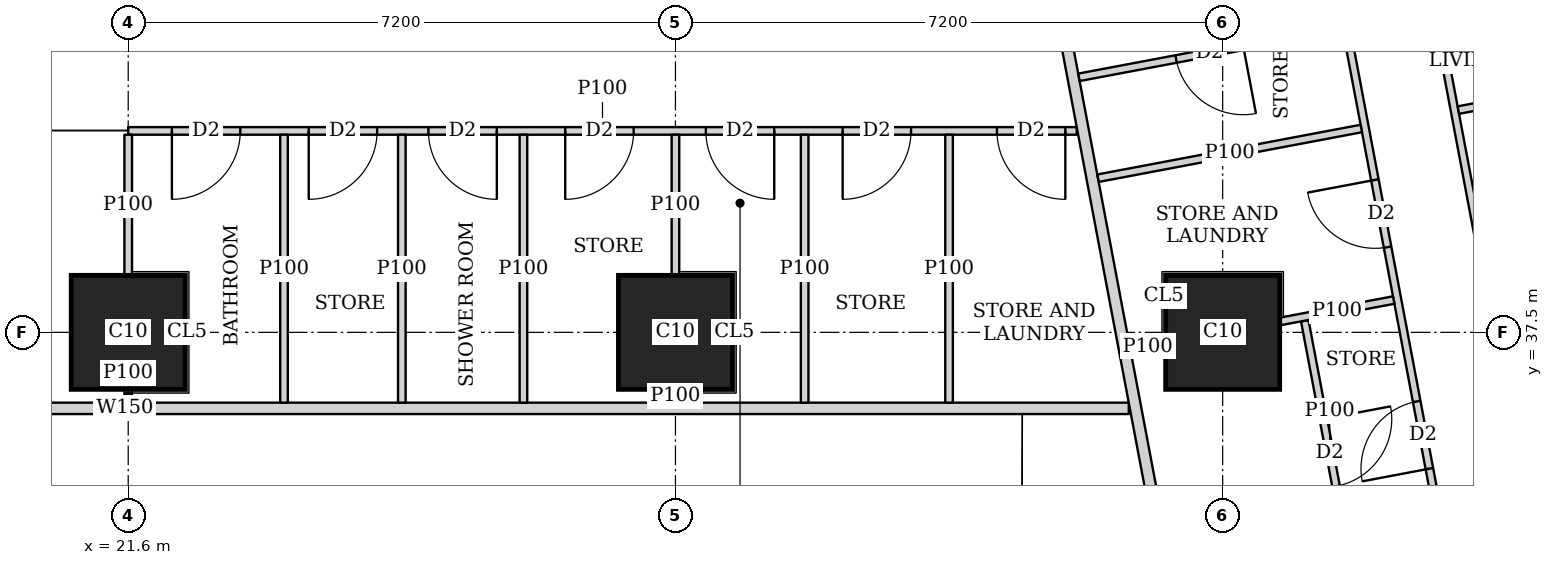
"""IFC4 building model, lengths in metres.
Left out: names, types, materials, properties, quantities, classifications, styles, units other than length and angle.
Written with IfcOpenShell. Run it as: python <this file> out.ifc"""

import sys

from ifc_helpers import new_model, si_unit, direction, frame, frame_2d, origin, origin_2d, place, context, subcontext, project, spatial, rectangle, extrude, element, fill, save


model = new_model("IFC4")
c1 = context("Model", 3, precision=1e-05, world=origin(), true_north=direction((0.0, 1.0)))
c2 = subcontext(c1, "Body", "Model", "MODEL_VIEW")
j1 = project(units=[si_unit("LENGTHUNIT", "METRE"), si_unit("PLANEANGLEUNIT", "RADIAN")], contexts=[c1])
p1 = place(None, origin())
s1 = spatial("IfcSite", under=j1, at=p1, CompositionType="ELEMENT")
p2 = place(p1, origin())
s2 = spatial("IfcBuilding", under=s1, at=p2, CompositionType="ELEMENT")
p3 = place(p2, frame((0.0, 0.0, 139.55)))
s3 = spatial("IfcBuildingStorey", under=s2, at=p3, CompositionType="ELEMENT", Elevation=139.55)
for number, where, z_axis, x_axis in (
    (1, (21.6, 37.5, 0.0), (0.0, 0.0, 1.0), (1.0, 0.0, 0.0)),
    (2, (28.8, 37.5, 0.0), (0.0, 0.0, 1.0), (1.0, 0.0, 0.0)),
    (3, (36.0, 37.5, 0.0), (0.0, 0.0, 1.0), (1.0, 0.0, 0.0)),
):
    element("IfcColumn", number, at=place(p3, frame(where, z_axis=z_axis, x_axis=x_axis)), inside=s3, PredefinedType="COLUMN", context=c2, shape_type="SweptSolid", body=[
        extrude(rectangle(XDim=1.5, YDim=1.5, at=origin_2d()), origin(), (0.0, 0.0, 1.0), 3.75),
    ])
p4 = place(p3, frame((8.35, 36.5, 0.0), z_axis=(0.0, 0.0, 1.0), x_axis=(1.0, 0.0, 0.0)))
e4 = element("IfcWall", 4, at=p4, inside=s3, PredefinedType="SOLIDWALL", context=c2, shape_type="SweptSolid", body=[
    extrude(rectangle(XDim=26.415, YDim=0.15, at=frame_2d((13.208, 0.0))), origin(), (0.0, 0.0, 1.0), 3.5),
])
p5 = place(p4, frame((2.6, 0.0, 0.0)))
e5 = element("IfcOpeningElement", 5, at=p5, cuts=e4, PredefinedType="OPENING", context=c2, shape_type="SweptSolid", body=[
    extrude(rectangle(XDim=1.0, YDim=2.1, at=frame_2d((0.5, 1.05))), frame((0.0, 0.085, 0.0), z_axis=(0.0, -1.0, 0.0), x_axis=(1.0, 0.0, 0.0)), (0.0, 0.0, 1.0), 0.17),
])
p6 = place(p4, frame((10.75, 0.0, 0.0)))
e6 = element("IfcOpeningElement", 6, at=p6, cuts=e4, PredefinedType="OPENING", context=c2, shape_type="SweptSolid", body=[
    extrude(rectangle(XDim=1.0, YDim=2.1, at=frame_2d((0.5, 1.05))), frame((0.0, 0.085, 0.0), z_axis=(0.0, -1.0, 0.0), x_axis=(1.0, 0.0, 0.0)), (0.0, 0.0, 1.0), 0.17),
])
p7 = place(p3, frame((33.623, 43.022, 0.0), z_axis=(0.0, 0.0, 1.0), x_axis=(0.185596841028, -0.98262597798, 0.0)))
e7 = element("IfcWall", 7, at=p7, inside=s3, PredefinedType="SOLIDWALL", context=c2, shape_type="SweptSolid", body=[
    extrude(rectangle(XDim=41.66, YDim=0.15, at=frame_2d((20.83, 0.0))), origin(), (0.0, 0.0, 1.0), 2.5),
])
p8 = place(p7, frame((20.242, 0.0, 0.0)))
e8 = element("IfcOpeningElement", 8, at=p8, cuts=e7, PredefinedType="OPENING", context=c2, shape_type="SweptSolid", body=[
    extrude(rectangle(XDim=1.0, YDim=2.1, at=frame_2d((0.5, 1.05))), frame((0.0, 0.085, 0.0), z_axis=(0.0, -1.0, 0.0), x_axis=(1.0, 0.0, 0.0)), (0.0, 0.0, 1.0), 0.17),
])
p9 = place(p7, frame((24.714, 0.0, 0.0)))
e9 = element("IfcOpeningElement", 9, at=p9, cuts=e7, PredefinedType="OPENING", context=c2, shape_type="SweptSolid", body=[
    extrude(rectangle(XDim=1.0, YDim=2.1, at=frame_2d((0.5, 1.05))), frame((0.0, 0.085, 0.0), z_axis=(0.0, -1.0, 0.0), x_axis=(1.0, 0.0, 0.0)), (0.0, 0.0, 1.0), 0.17),
])
p10 = place(p7, frame((31.206, 0.0, 0.0)))
e10 = element("IfcOpeningElement", 10, at=p10, cuts=e7, PredefinedType="OPENING", context=c2, shape_type="SweptSolid", body=[
    extrude(rectangle(XDim=1.0, YDim=2.1, at=frame_2d((0.5, 1.05))), frame((0.0, 0.085, 0.0), z_axis=(0.0, -1.0, 0.0), x_axis=(1.0, 0.0, 0.0)), (0.0, 0.0, 1.0), 0.17),
])
p11 = place(p3, frame((38.701, 42.27, 0.0), z_axis=(0.0, 0.0, 1.0), x_axis=(0.185640619081, -0.98261770824, 0.0)))
e11 = element("IfcWall", 11, at=p11, inside=s3, PredefinedType="PARTITIONING", context=c2, shape_type="SweptSolid", body=[
    extrude(rectangle(XDim=17.103, YDim=0.1, at=frame_2d((8.552, 0.0))), origin(), (0.0, 0.0, 1.0), 2.5),
])
p12 = place(p11, frame((16.053, 0.0, 0.0)))
e12 = element("IfcOpeningElement", 12, at=p12, cuts=e11, PredefinedType="OPENING", context=c2, shape_type="SweptSolid", body=[
    extrude(rectangle(XDim=0.9, YDim=2.1, at=frame_2d((0.45, 1.05))), frame((0.0, 0.06, 0.0), z_axis=(0.0, -1.0, 0.0), x_axis=(1.0, 0.0, 0.0)), (0.0, 0.0, 1.0), 0.12),
])
p13 = place(p11, frame((12.077, 0.0, 0.0)))
e13 = element("IfcOpeningElement", 13, at=p13, cuts=e11, PredefinedType="OPENING", context=c2, shape_type="SweptSolid", body=[
    extrude(rectangle(XDim=0.9, YDim=2.1, at=frame_2d((0.45, 1.05))), frame((0.0, 0.06, 0.0), z_axis=(0.0, -1.0, 0.0), x_axis=(1.0, 0.0, 0.0)), (0.0, 0.0, 1.0), 0.12),
])
p14 = place(p11, frame((8.42, 0.0, 0.0)))
e14 = element("IfcOpeningElement", 14, at=p14, cuts=e11, PredefinedType="OPENING", context=c2, shape_type="SweptSolid", body=[
    extrude(rectangle(XDim=0.9, YDim=2.1, at=frame_2d((0.45, 1.05))), frame((0.0, 0.06, 0.0), z_axis=(0.0, -1.0, 0.0), x_axis=(1.0, 0.0, 0.0)), (0.0, 0.0, 1.0), 0.12),
])
p15 = place(p11, frame((4.444, 0.0, 0.0)))
e15 = element("IfcOpeningElement", 15, at=p15, cuts=e11, PredefinedType="OPENING", context=c2, shape_type="SweptSolid", body=[
    extrude(rectangle(XDim=0.9, YDim=2.1, at=frame_2d((0.45, 1.05))), frame((0.0, 0.06, 0.0), z_axis=(0.0, -1.0, 0.0), x_axis=(1.0, 0.0, 0.0)), (0.0, 0.0, 1.0), 0.12),
])
p16 = place(p3, frame((37.411, 42.638, 0.0), z_axis=(0.0, 0.0, 1.0), x_axis=(0.185555586706, -0.982633769134, 0.0)))
e16 = element("IfcWall", 16, at=p16, inside=s3, PredefinedType="PARTITIONING", context=c2, shape_type="SweptSolid", body=[
    extrude(rectangle(XDim=17.704, YDim=0.1, at=frame_2d((8.852, 0.0))), origin(), (0.0, 0.0, 1.0), 2.5),
])
p17 = place(p16, frame((16.28, 0.0, 0.0)))
e17 = element("IfcOpeningElement", 17, at=p17, cuts=e16, PredefinedType="OPENING", context=c2, shape_type="SweptSolid", body=[
    extrude(rectangle(XDim=0.9, YDim=2.1, at=frame_2d((0.45, 1.05))), frame((0.0, 0.06, 0.0), z_axis=(0.0, -1.0, 0.0), x_axis=(1.0, 0.0, 0.0)), (0.0, 0.0, 1.0), 0.12),
])
p18 = place(p16, frame((12.688, 0.0, 0.0)))
e18 = element("IfcOpeningElement", 18, at=p18, cuts=e16, PredefinedType="OPENING", context=c2, shape_type="SweptSolid", body=[
    extrude(rectangle(XDim=0.9, YDim=2.1, at=frame_2d((0.45, 1.05))), frame((0.0, 0.06, 0.0), z_axis=(0.0, -1.0, 0.0), x_axis=(1.0, 0.0, 0.0)), (0.0, 0.0, 1.0), 0.12),
])
p19 = place(p16, frame((8.822, 0.0, 0.0)))
e19 = element("IfcOpeningElement", 19, at=p19, cuts=e16, PredefinedType="OPENING", context=c2, shape_type="SweptSolid", body=[
    extrude(rectangle(XDim=0.9, YDim=2.1, at=frame_2d((0.45, 1.05))), frame((0.0, 0.06, 0.0), z_axis=(0.0, -1.0, 0.0), x_axis=(1.0, 0.0, 0.0)), (0.0, 0.0, 1.0), 0.12),
])
p20 = place(p16, frame((3.188, 0.0, 0.0)))
e20 = element("IfcOpeningElement", 20, at=p20, cuts=e16, PredefinedType="OPENING", context=c2, shape_type="SweptSolid", body=[
    extrude(rectangle(XDim=0.9, YDim=2.1, at=frame_2d((0.45, 1.05))), frame((0.0, 0.06, 0.0), z_axis=(0.0, -1.0, 0.0), x_axis=(1.0, 0.0, 0.0)), (0.0, 0.0, 1.0), 0.12),
])
p21 = place(p16, frame((0.15, 0.0, 0.0)))
e21 = element("IfcOpeningElement", 21, at=p21, cuts=e16, PredefinedType="OPENING", context=c2, shape_type="SweptSolid", body=[
    extrude(rectangle(XDim=0.9, YDim=2.1, at=frame_2d((0.45, 1.05))), frame((0.0, 0.06, 0.0), z_axis=(0.0, -1.0, 0.0), x_axis=(1.0, 0.0, 0.0)), (0.0, 0.0, 1.0), 0.12),
])
p22 = place(p16, frame((14.371, 0.0, 0.0)))
e22 = element("IfcOpeningElement", 22, at=p22, cuts=e16, PredefinedType="OPENING", context=c2, shape_type="SweptSolid", body=[
    extrude(rectangle(XDim=0.9, YDim=2.1, at=frame_2d((0.45, 1.05))), frame((0.0, 0.06, 0.0), z_axis=(0.0, -1.0, 0.0), x_axis=(1.0, 0.0, 0.0)), (0.0, 0.0, 1.0), 0.12),
])
p23 = place(p16, frame((10.78, 0.0, 0.0)))
e23 = element("IfcOpeningElement", 23, at=p23, cuts=e16, PredefinedType="OPENING", context=c2, shape_type="SweptSolid", body=[
    extrude(rectangle(XDim=0.9, YDim=2.1, at=frame_2d((0.45, 1.05))), frame((0.0, 0.06, 0.0), z_axis=(0.0, -1.0, 0.0), x_axis=(1.0, 0.0, 0.0)), (0.0, 0.0, 1.0), 0.12),
])
p24 = place(p16, frame((6.154, 0.0, 0.0)))
e24 = element("IfcOpeningElement", 24, at=p24, cuts=e16, PredefinedType="OPENING", context=c2, shape_type="SweptSolid", body=[
    extrude(rectangle(XDim=0.9, YDim=2.1, at=frame_2d((0.45, 1.05))), frame((0.0, 0.06, 0.0), z_axis=(0.0, -1.0, 0.0), x_axis=(1.0, 0.0, 0.0)), (0.0, 0.0, 1.0), 0.12),
])
p25 = place(p3, frame((43.277, 41.212, 0.0), z_axis=(0.0, 0.0, 1.0), x_axis=(-0.982665405803, -0.185387972203, 0.0)))
e25 = element("IfcWall", 25, at=p25, inside=s3, PredefinedType="PARTITIONING", context=c2, shape_type="SweptSolid", body=[
    extrude(rectangle(XDim=4.25, YDim=0.1, at=frame_2d((2.125, 0.0))), origin(), (0.0, 0.0, 1.0), 2.1),
])
p26 = place(p3, frame((37.824, 40.182, 0.0), z_axis=(0.0, 0.0, 1.0), x_axis=(-0.982648794755, -0.185475998897, 0.0)))
e26 = element("IfcWall", 26, at=p26, inside=s3, PredefinedType="PARTITIONING", context=c2, shape_type="SweptSolid", body=[
    extrude(rectangle(XDim=3.525, YDim=0.1, at=frame_2d((1.763, 0.0))), origin(), (0.0, 0.0, 1.0), 3.5),
])
p27 = place(p3, frame((38.25, 37.925, 0.0), z_axis=(0.0, 0.0, 1.0), x_axis=(-0.982676595259, -0.18532865167, 0.0)))
e27 = element("IfcWall", 27, at=p27, inside=s3, PredefinedType="PARTITIONING", context=c2, shape_type="SweptSolid", body=[
    extrude(rectangle(XDim=1.516, YDim=0.1, at=frame_2d((0.758, 0.0))), origin(), (0.0, 0.0, 1.0), 3.5),
])
p28 = place(p3, frame((35.24, 37.357, 0.0), z_axis=(0.0, 0.0, 1.0), x_axis=(-0.982559813104, -0.18594680334, 0.0)))
e28 = element("IfcWall", 28, at=p28, inside=s3, PredefinedType="PARTITIONING", context=c2, shape_type="SweptSolid", body=[
    extrude(rectangle(XDim=0.462, YDim=0.1, at=frame_2d((0.231, 0.0))), origin(), (0.0, 0.0, 1.0), 3.5),
])
p29 = place(p3, frame((21.6, 40.15, 0.0), z_axis=(0.0, 0.0, 1.0), x_axis=(1.0, 0.0, 0.0)))
e29 = element("IfcWall", 29, at=p29, inside=s3, PredefinedType="PARTITIONING", context=c2, shape_type="SweptSolid", body=[
    extrude(rectangle(XDim=12.48, YDim=0.1, at=frame_2d((6.24, 0.0))), origin(), (0.0, 0.0, 1.0), 3.5),
])
p30 = place(p29, frame((0.575, 0.0, 0.0)))
e30 = element("IfcOpeningElement", 30, at=p30, cuts=e29, PredefinedType="OPENING", context=c2, shape_type="SweptSolid", body=[
    extrude(rectangle(XDim=0.9, YDim=2.1, at=frame_2d((0.45, 1.05))), frame((0.0, 0.06, 0.0), z_axis=(0.0, -1.0, 0.0), x_axis=(1.0, 0.0, 0.0)), (0.0, 0.0, 1.0), 0.12),
])
p31 = place(p29, frame((3.95, 0.0, 0.0)))
e31 = element("IfcOpeningElement", 31, at=p31, cuts=e29, PredefinedType="OPENING", context=c2, shape_type="SweptSolid", body=[
    extrude(rectangle(XDim=0.9, YDim=2.1, at=frame_2d((0.45, 1.05))), frame((0.0, 0.06, 0.0), z_axis=(0.0, -1.0, 0.0), x_axis=(1.0, 0.0, 0.0)), (0.0, 0.0, 1.0), 0.12),
])
p32 = place(p29, frame((7.6, 0.0, 0.0)))
e32 = element("IfcOpeningElement", 32, at=p32, cuts=e29, PredefinedType="OPENING", context=c2, shape_type="SweptSolid", body=[
    extrude(rectangle(XDim=0.9, YDim=2.1, at=frame_2d((0.45, 1.05))), frame((0.0, 0.06, 0.0), z_axis=(0.0, -1.0, 0.0), x_axis=(1.0, 0.0, 0.0)), (0.0, 0.0, 1.0), 0.12),
])
p33 = place(p29, frame((11.43, 0.0, 0.0)))
e33 = element("IfcOpeningElement", 33, at=p33, cuts=e29, PredefinedType="OPENING", context=c2, shape_type="SweptSolid", body=[
    extrude(rectangle(XDim=0.9, YDim=2.1, at=frame_2d((0.45, 1.05))), frame((0.0, 0.06, 0.0), z_axis=(0.0, -1.0, 0.0), x_axis=(1.0, 0.0, 0.0)), (0.0, 0.0, 1.0), 0.12),
])
p34 = place(p29, frame((2.375, 0.0, 0.0)))
e34 = element("IfcOpeningElement", 34, at=p34, cuts=e29, PredefinedType="OPENING", context=c2, shape_type="SweptSolid", body=[
    extrude(rectangle(XDim=0.9, YDim=2.1, at=frame_2d((0.45, 1.05))), frame((0.0, 0.06, 0.0), z_axis=(0.0, -1.0, 0.0), x_axis=(1.0, 0.0, 0.0)), (0.0, 0.0, 1.0), 0.12),
])
p35 = place(p29, frame((5.75, 0.0, 0.0)))
e35 = element("IfcOpeningElement", 35, at=p35, cuts=e29, PredefinedType="OPENING", context=c2, shape_type="SweptSolid", body=[
    extrude(rectangle(XDim=0.9, YDim=2.1, at=frame_2d((0.45, 1.05))), frame((0.0, 0.06, 0.0), z_axis=(0.0, -1.0, 0.0), x_axis=(1.0, 0.0, 0.0)), (0.0, 0.0, 1.0), 0.12),
])
p36 = place(p29, frame((9.4, 0.0, 0.0)))
e36 = element("IfcOpeningElement", 36, at=p36, cuts=e29, PredefinedType="OPENING", context=c2, shape_type="SweptSolid", body=[
    extrude(rectangle(XDim=0.9, YDim=2.1, at=frame_2d((0.45, 1.05))), frame((0.0, 0.06, 0.0), z_axis=(0.0, -1.0, 0.0), x_axis=(1.0, 0.0, 0.0)), (0.0, 0.0, 1.0), 0.12),
])
p37 = place(p3, frame((21.6, 36.575, 0.0), z_axis=(0.0, 0.0, 1.0), x_axis=(0.0, 1.0, 0.0)))
e37 = element("IfcWall", 37, at=p37, inside=s3, PredefinedType="PARTITIONING", context=c2, shape_type="SweptSolid", body=[
    extrude(rectangle(XDim=0.174, YDim=0.1, at=frame_2d((0.087, 0.0))), origin(), (0.0, 0.0, 1.0), 3.5),
])
p38 = place(p3, frame((21.6, 38.251, 0.0), z_axis=(0.0, 0.0, 1.0), x_axis=(0.0, 1.0, 0.0)))
e38 = element("IfcWall", 38, at=p38, inside=s3, PredefinedType="PARTITIONING", context=c2, shape_type="SweptSolid", body=[
    extrude(rectangle(XDim=1.849, YDim=0.1, at=frame_2d((0.925, 0.0))), origin(), (0.0, 0.0, 1.0), 3.5),
])
p39 = place(p3, frame((25.2, 36.575, 0.0), z_axis=(0.0, 0.0, 1.0), x_axis=(0.0, 1.0, 0.0)))
e39 = element("IfcWall", 39, at=p39, inside=s3, PredefinedType="PARTITIONING", context=c2, shape_type="SweptSolid", body=[
    extrude(rectangle(XDim=3.525, YDim=0.1, at=frame_2d((1.763, 0.0))), origin(), (0.0, 0.0, 1.0), 3.5),
])
p40 = place(p3, frame((28.8, 36.575, 0.0), z_axis=(0.0, 0.0, 1.0), x_axis=(0.0, 1.0, 0.0)))
e40 = element("IfcWall", 40, at=p40, inside=s3, PredefinedType="PARTITIONING", context=c2, shape_type="SweptSolid", body=[
    extrude(rectangle(XDim=0.174, YDim=0.1, at=frame_2d((0.087, 0.0))), origin(), (0.0, 0.0, 1.0), 3.5),
])
p41 = place(p3, frame((28.8, 38.251, 0.0), z_axis=(0.0, 0.0, 1.0), x_axis=(0.0, 1.0, 0.0)))
e41 = element("IfcWall", 41, at=p41, inside=s3, PredefinedType="PARTITIONING", context=c2, shape_type="SweptSolid", body=[
    extrude(rectangle(XDim=1.849, YDim=0.1, at=frame_2d((0.925, 0.0))), origin(), (0.0, 0.0, 1.0), 3.5),
])
for number, where, z_axis, x_axis in (
    (42, (32.4, 36.575, 0.0), (0.0, 0.0, 1.0), (0.0, 1.0, 0.0)),
    (43, (23.65, 36.575, 0.0), (0.0, 0.0, 1.0), (0.0, 1.0, 0.0)),
    (44, (26.8, 36.575, 0.0), (0.0, 0.0, 1.0), (0.0, 1.0, 0.0)),
    (45, (30.5, 36.575, 0.0), (0.0, 0.0, 1.0), (0.0, 1.0, 0.0)),
):
    element("IfcWall", number, at=place(p3, frame(where, z_axis=z_axis, x_axis=x_axis)), inside=s3, PredefinedType="PARTITIONING", context=c2, shape_type="SweptSolid", body=[
        extrude(rectangle(XDim=3.525, YDim=0.1, at=frame_2d((1.763, 0.0))), origin(), (0.0, 0.0, 1.0), 3.5),
    ])
p42 = place(p3, frame((37.08, 37.653, 0.0), z_axis=(0.0, 0.0, 1.0), x_axis=(0.185864634688, -0.982575359742, 0.0)))
e46 = element("IfcWall", 46, at=p42, inside=s3, PredefinedType="PARTITIONING", context=c2, shape_type="SweptSolid", body=[
    extrude(rectangle(XDim=3.535, YDim=0.1, at=frame_2d((1.767, 0.0))), origin(), (0.0, 0.0, 1.0), 3.5),
])
p43 = place(p42, frame((1.317, 0.0, 0.0)))
e47 = element("IfcOpeningElement", 47, at=p43, cuts=e46, PredefinedType="OPENING", context=c2, shape_type="SweptSolid", body=[
    extrude(rectangle(XDim=0.9, YDim=2.1, at=frame_2d((0.45, 1.05))), frame((0.0, 0.06, 0.0), z_axis=(0.0, -1.0, 0.0), x_axis=(1.0, 0.0, 0.0)), (0.0, 0.0, 1.0), 0.12),
])
p44 = place(p3, frame((37.573, 41.509, 0.0), z_axis=(0.0, 0.0, 1.0), x_axis=(-0.982638553676, -0.185530247748, 0.0)))
e48 = element("IfcWall", 48, at=p44, inside=s3, PredefinedType="PARTITIONING", context=c2, shape_type="SweptSolid", body=[
    extrude(rectangle(XDim=3.525, YDim=0.1, at=frame_2d((1.763, 0.0))), origin(), (0.0, 0.0, 1.0), 3.5),
])
p45 = place(p44, frame((1.325, 0.0, 0.0)))
e49 = element("IfcOpeningElement", 49, at=p45, cuts=e48, PredefinedType="OPENING", context=c2, shape_type="SweptSolid", body=[
    extrude(rectangle(XDim=0.9, YDim=2.1, at=frame_2d((0.45, 1.05))), frame((0.0, 0.06, 0.0), z_axis=(0.0, -1.0, 0.0), x_axis=(1.0, 0.0, 0.0)), (0.0, 0.0, 1.0), 0.12),
])
p46 = place(p20, origin())
e50 = element("IfcDoor", 50, at=p46, inside=s3, OperationType="SINGLE_SWING_RIGHT", PredefinedType="DOOR", context=c2, shape_type="SweptSolid", body=[
    extrude(rectangle(XDim=0.9, YDim=2.1, at=frame_2d((0.45, 1.05))), frame((0.0, 0.025, 0.0), z_axis=(0.0, -1.0, 0.0), x_axis=(1.0, 0.0, 0.0)), (0.0, 0.0, 1.0), 0.05),
])
fill(e20, e50)
p47 = place(p24, origin())
e51 = element("IfcDoor", 51, at=p47, inside=s3, OperationType="SINGLE_SWING_LEFT", PredefinedType="DOOR", context=c2, shape_type="SweptSolid", body=[
    extrude(rectangle(XDim=0.9, YDim=2.1, at=frame_2d((0.45, 1.05))), frame((0.0, 0.025, 0.0), z_axis=(0.0, -1.0, 0.0), x_axis=(1.0, 0.0, 0.0)), (0.0, 0.0, 1.0), 0.05),
])
fill(e24, e51)
p48 = place(p30, origin())
e52 = element("IfcDoor", 52, at=p48, inside=s3, OperationType="SINGLE_SWING_RIGHT", PredefinedType="DOOR", context=c2, shape_type="SweptSolid", body=[
    extrude(rectangle(XDim=0.9, YDim=2.1, at=frame_2d((0.45, 1.05))), frame((0.0, 0.025, 0.0), z_axis=(0.0, -1.0, 0.0), x_axis=(1.0, 0.0, 0.0)), (0.0, 0.0, 1.0), 0.05),
])
fill(e30, e52)
p49 = place(p31, origin())
e53 = element("IfcDoor", 53, at=p49, inside=s3, OperationType="SINGLE_SWING_LEFT", PredefinedType="DOOR", context=c2, shape_type="SweptSolid", body=[
    extrude(rectangle(XDim=0.9, YDim=2.1, at=frame_2d((0.45, 1.05))), frame((0.0, 0.025, 0.0), z_axis=(0.0, -1.0, 0.0), x_axis=(1.0, 0.0, 0.0)), (0.0, 0.0, 1.0), 0.05),
])
fill(e31, e53)
p50 = place(p32, origin())
e54 = element("IfcDoor", 54, at=p50, inside=s3, OperationType="SINGLE_SWING_LEFT", PredefinedType="DOOR", context=c2, shape_type="SweptSolid", body=[
    extrude(rectangle(XDim=0.9, YDim=2.1, at=frame_2d((0.45, 1.05))), frame((0.0, 0.025, 0.0), z_axis=(0.0, -1.0, 0.0), x_axis=(1.0, 0.0, 0.0)), (0.0, 0.0, 1.0), 0.05),
])
fill(e32, e54)
p51 = place(p33, origin())
e55 = element("IfcDoor", 55, at=p51, inside=s3, OperationType="SINGLE_SWING_LEFT", PredefinedType="DOOR", context=c2, shape_type="SweptSolid", body=[
    extrude(rectangle(XDim=0.9, YDim=2.1, at=frame_2d((0.45, 1.05))), frame((0.0, 0.025, 0.0), z_axis=(0.0, -1.0, 0.0), x_axis=(1.0, 0.0, 0.0)), (0.0, 0.0, 1.0), 0.05),
])
fill(e33, e55)
p52 = place(p34, origin())
e56 = element("IfcDoor", 56, at=p52, inside=s3, OperationType="SINGLE_SWING_RIGHT", PredefinedType="DOOR", context=c2, shape_type="SweptSolid", body=[
    extrude(rectangle(XDim=0.9, YDim=2.1, at=frame_2d((0.45, 1.05))), frame((0.0, 0.025, 0.0), z_axis=(0.0, -1.0, 0.0), x_axis=(1.0, 0.0, 0.0)), (0.0, 0.0, 1.0), 0.05),
])
fill(e34, e56)
p53 = place(p35, origin())
e57 = element("IfcDoor", 57, at=p53, inside=s3, OperationType="SINGLE_SWING_RIGHT", PredefinedType="DOOR", context=c2, shape_type="SweptSolid", body=[
    extrude(rectangle(XDim=0.9, YDim=2.1, at=frame_2d((0.45, 1.05))), frame((0.0, 0.025, 0.0), z_axis=(0.0, -1.0, 0.0), x_axis=(1.0, 0.0, 0.0)), (0.0, 0.0, 1.0), 0.05),
])
fill(e35, e57)
p54 = place(p36, origin())
e58 = element("IfcDoor", 58, at=p54, inside=s3, OperationType="SINGLE_SWING_RIGHT", PredefinedType="DOOR", context=c2, shape_type="SweptSolid", body=[
    extrude(rectangle(XDim=0.9, YDim=2.1, at=frame_2d((0.45, 1.05))), frame((0.0, 0.025, 0.0), z_axis=(0.0, -1.0, 0.0), x_axis=(1.0, 0.0, 0.0)), (0.0, 0.0, 1.0), 0.05),
])
fill(e36, e58)
p55 = place(p43, origin())
e59 = element("IfcDoor", 59, at=p55, inside=s3, OperationType="SINGLE_SWING_LEFT", PredefinedType="DOOR", context=c2, shape_type="SweptSolid", body=[
    extrude(rectangle(XDim=0.9, YDim=2.1, at=frame_2d((0.45, 1.05))), frame((0.0, 0.025, 0.0), z_axis=(0.0, -1.0, 0.0), x_axis=(1.0, 0.0, 0.0)), (0.0, 0.0, 1.0), 0.05),
])
fill(e47, e59)
p56 = place(p45, origin())
e60 = element("IfcDoor", 60, at=p56, inside=s3, OperationType="SINGLE_SWING_LEFT", PredefinedType="DOOR", context=c2, shape_type="SweptSolid", body=[
    extrude(rectangle(XDim=0.9, YDim=2.1, at=frame_2d((0.45, 1.05))), frame((0.0, 0.025, 0.0), z_axis=(0.0, -1.0, 0.0), x_axis=(1.0, 0.0, 0.0)), (0.0, 0.0, 1.0), 0.05),
])
fill(e49, e60)
save(model, sys.argv[1])
